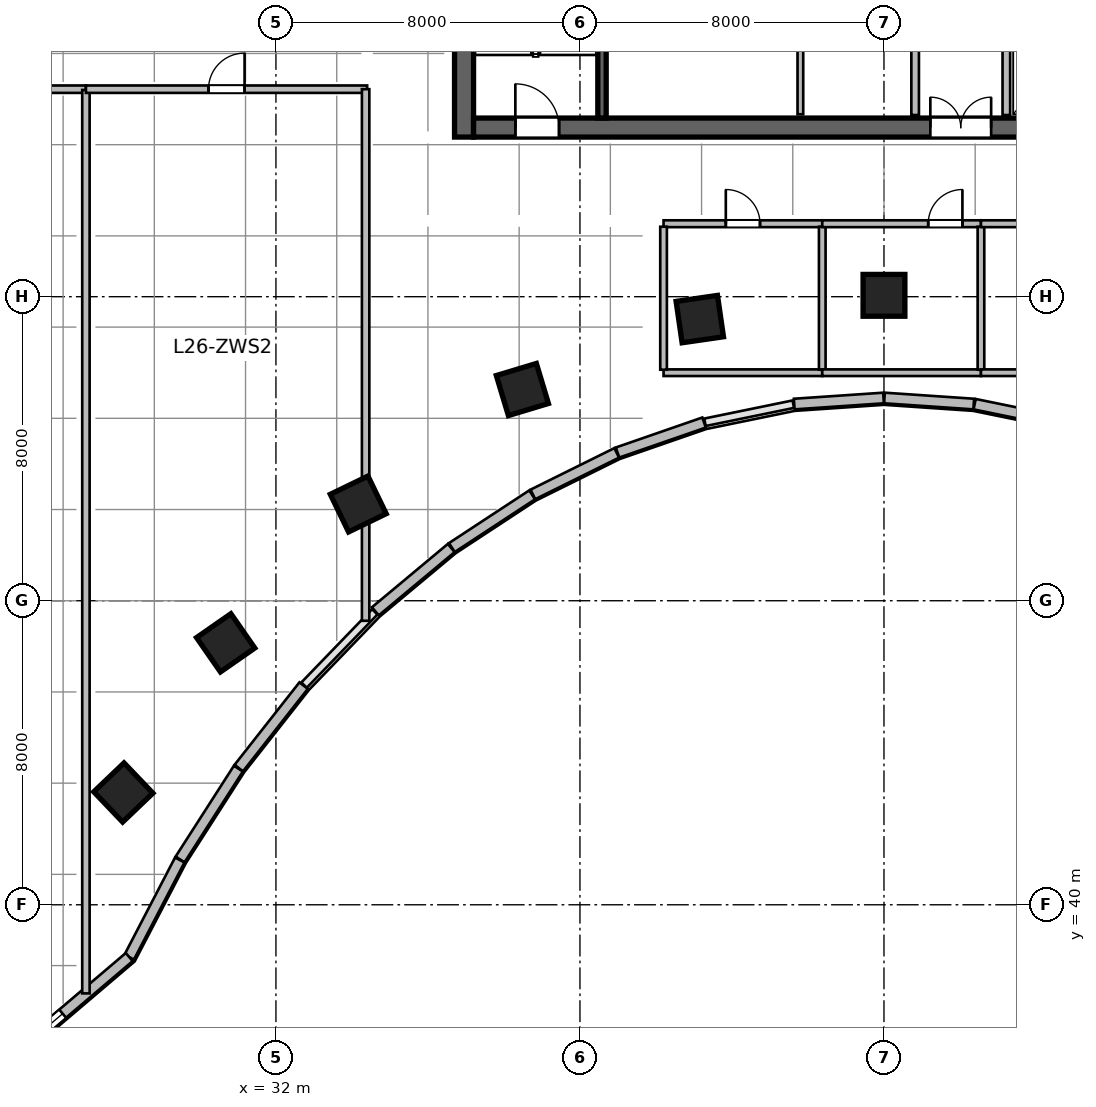
"""IFC4 building model, lengths in metres.
Left out: names, types, materials, properties, quantities, classifications, styles, units other than length and angle.
Written with IfcOpenShell. Run it as: python <this file> out.ifc"""

import sys

from ifc_helpers import new_model, si_unit, direction, frame, frame_2d, origin, origin_2d, place, context, subcontext, project, spatial, rectangle, extrude, source, transform, mapped, element, fill, save


model = new_model("IFC4")
c1 = context("Model", 3, precision=1e-05, world=origin(), true_north=direction((0.0, 1.0)))
c2 = subcontext(c1, "Body", "Model", "MODEL_VIEW")
j1 = project(units=[si_unit("LENGTHUNIT", "METRE"), si_unit("PLANEANGLEUNIT", "RADIAN")], contexts=[c1])
p1 = place(None, origin())
s1 = spatial("IfcSite", under=j1, at=p1, CompositionType="ELEMENT")
p2 = place(p1, origin())
s2 = spatial("IfcBuilding", under=s1, at=p2, CompositionType="ELEMENT")
p3 = place(p2, frame((0.0, 0.0, 111.6)))
s3 = spatial("IfcBuildingStorey", under=s2, at=p3, CompositionType="ELEMENT", Elevation=111.6)
m1 = source(origin(), c2, "Body", "SweptSolid", [
    extrude(rectangle(XDim=12.0, YDim=0.5, at=frame_2d((6.0, 0.0))), origin(), (0.0, 0.0, 1.0), 3.9),
])
p4 = place(p3, frame((36.95, 60.2, 0.0), z_axis=(0.0, 0.0, 1.0), x_axis=(0.0, 1.0, 0.0)))
e1 = element("IfcWall", 1, at=p4, inside=s3, PredefinedType="SHEAR", context=c2, shape_type="MappedRepresentation", body=[
    mapped(m1, transform((0.0, 0.0, 0.0), scale=1.0)),
])
m2 = source(origin(), c2, "Body", "SweptSolid", [
    extrude(rectangle(XDim=21.6, YDim=0.5, at=frame_2d((10.8, 0.0))), origin(), (0.0, 0.0, 1.0), 3.9),
])
p5 = place(p3, frame((37.2, 60.45, 0.0), z_axis=(0.0, 0.0, 1.0), x_axis=(1.0, 0.0, 0.0)))
e2 = element("IfcWall", 2, at=p5, inside=s3, PredefinedType="SHEAR", context=c2, shape_type="MappedRepresentation", body=[
    mapped(m2, transform((0.0, 0.0, 0.0), scale=1.0)),
])
p6 = place(p5, frame((1.1, 0.0, 0.0)))
e3 = element("IfcOpeningElement", 3, at=p6, cuts=e2, PredefinedType="OPENING", context=c2, shape_type="SweptSolid", body=[
    extrude(rectangle(XDim=1.15, YDim=2.15, at=frame_2d((0.575, 1.075))), frame((0.0, 0.26, 0.0), z_axis=(0.0, -1.0, 0.0), x_axis=(1.0, 0.0, 0.0)), (0.0, 0.0, 1.0), 0.52),
])
p7 = place(p5, frame((19.5, 0.0, 0.0)))
e4 = element("IfcOpeningElement", 4, at=p7, cuts=e2, PredefinedType="OPENING", context=c2, shape_type="SweptSolid", body=[
    extrude(rectangle(XDim=0.9, YDim=2.1, at=frame_2d((0.45, 1.05))), frame((0.0, 0.26, 0.0), z_axis=(0.0, -1.0, 0.0), x_axis=(1.0, 0.0, 0.0)), (0.0, 0.0, 1.0), 0.52),
])
p8 = place(p5, frame((12.02, 0.0, 0.0)))
e5 = element("IfcOpeningElement", 5, at=p8, cuts=e2, PredefinedType="OPENING", context=c2, shape_type="SweptSolid", body=[
    extrude(rectangle(XDim=1.6, YDim=2.15, at=frame_2d((0.8, 1.075))), frame((0.0, 0.26, 0.0), z_axis=(0.0, -1.0, 0.0), x_axis=(1.0, 0.0, 0.0)), (0.0, 0.0, 1.0), 0.52),
])
m3 = source(origin(), c2, "Body", "SweptSolid", [
    extrude(rectangle(XDim=11.0, YDim=0.22, at=frame_2d((5.5, 0.0))), origin(), (0.0, 0.0, 1.0), 3.9),
])
p9 = place(p3, frame((40.58, 60.7, 0.0), z_axis=(0.0, 0.0, 1.0), x_axis=(0.0, 1.0, 0.0)))
e6 = element("IfcWall", 6, at=p9, inside=s3, PredefinedType="SHEAR", context=c2, shape_type="MappedRepresentation", body=[
    mapped(m3, transform((0.0, 0.0, 0.0), scale=1.0)),
])
m4 = source(origin(), c2, "Body", "SweptSolid", [
    extrude(rectangle(XDim=1.1, YDim=1.1, at=origin_2d()), origin(), (0.0, 0.0, 1.0), 3.9),
])
for number, where, z_axis, x_axis in (
    (7, (27.985, 42.955, 0.0), (0.0, 0.0, 1.0), (-0.691, 0.723, 0.0)),
    (8, (30.677, 46.892, 0.0), (0.0, 0.0, 1.0), (-0.571, 0.821, 0.0)),
    (9, (34.166, 50.545, 0.0), (0.0, 0.0, 1.0), (-0.436, 0.9, 0.0)),
    (10, (38.485, 53.558, 0.0), (0.0, 0.0, 1.0), (-0.289, 0.957, 0.0)),
    (11, (43.154, 55.411, 0.0), (0.0, 0.0, 1.0), (-0.143, 0.99, 0.0)),
    (12, (48.0, 56.036, 0.0), (0.0, 0.0, 1.0), (0.0, 1.0, 0.0)),
):
    element("IfcColumn", number, at=place(p3, frame(where, z_axis=z_axis, x_axis=x_axis)), inside=s3, PredefinedType="COLUMN", context=c2, shape_type="MappedRepresentation", body=[
        mapped(m4, transform((0.0, 0.0, 0.0), scale=1.0)),
    ])
m5 = source(origin(), c2, "Body", "SweptSolid", [
    extrude(rectangle(XDim=2.374, YDim=0.28, at=frame_2d((1.187, 0.0))), origin(), (0.0, 0.0, 1.0), 3.65),
])
p10 = place(p3, frame((52.711, 52.695, 0.0), z_axis=(0.0, 0.0, 1.0), x_axis=(-0.979619827472, 0.200860632341, 0.0)))
e13 = element("IfcWall", 13, at=p10, inside=s3, PredefinedType="SOLIDWALL", context=c2, shape_type="MappedRepresentation", body=[
    mapped(m5, transform((0.0, 0.0, 0.0), scale=1.0)),
])
m6 = source(origin(), c2, "Body", "SweptSolid", [
    extrude(rectangle(XDim=2.355, YDim=0.28, at=frame_2d((1.177, 0.0))), origin(), (0.0, 0.0, 1.0), 3.65),
])
for number, where, z_axis, x_axis in (
    (14, (50.362, 53.175, 0.0), (0.0, 0.0, 1.0), (-0.998, 0.068, 0.0)),
    (15, (47.988, 53.335, 0.0), (0.0, 0.0, 1.0), (-0.998, -0.068, 0.0)),
):
    element("IfcWall", number, at=place(p3, frame(where, z_axis=z_axis, x_axis=x_axis)), inside=s3, PredefinedType="SOLIDWALL", context=c2, shape_type="MappedRepresentation", body=[
        mapped(m6, transform((0.0, 0.0, 0.0), scale=1.0)),
    ])
m7 = source(origin(), c2, "Body", "SweptSolid", [
    extrude(rectangle(XDim=2.411, YDim=0.28, at=frame_2d((1.205, 0.0))), origin(), (0.0, 0.0, 1.0), 3.65),
])
p11 = place(p3, frame((43.266, 52.689, 0.0), z_axis=(0.0, 0.0, 1.0), x_axis=(-0.944880068161, -0.327416640982, 0.0)))
e16 = element("IfcWall", 16, at=p11, inside=s3, PredefinedType="SOLIDWALL", context=c2, shape_type="MappedRepresentation", body=[
    mapped(m7, transform((0.0, 0.0, 0.0), scale=1.0)),
])
m8 = source(origin(), c2, "Body", "SweptSolid", [
    extrude(rectangle(XDim=2.462, YDim=0.28, at=frame_2d((1.231, 0.0))), origin(), (0.0, 0.0, 1.0), 3.65),
])
p12 = place(p3, frame((40.967, 51.891, 0.0), z_axis=(0.0, 0.0, 1.0), x_axis=(-0.8959882207, -0.444077817917, 0.0)))
e17 = element("IfcWall", 17, at=p12, inside=s3, PredefinedType="SOLIDWALL", context=c2, shape_type="MappedRepresentation", body=[
    mapped(m8, transform((0.0, 0.0, 0.0), scale=1.0)),
])
m9 = source(origin(), c2, "Body", "SweptSolid", [
    extrude(rectangle(XDim=2.527, YDim=0.28, at=frame_2d((1.264, 0.0))), origin(), (0.0, 0.0, 1.0), 3.65),
])
p13 = place(p3, frame((38.742, 50.786, 0.0), z_axis=(0.0, 0.0, 1.0), x_axis=(-0.836011905051, -0.548711303523, 0.0)))
e18 = element("IfcWall", 18, at=p13, inside=s3, PredefinedType="SOLIDWALL", context=c2, shape_type="MappedRepresentation", body=[
    mapped(m9, transform((0.0, 0.0, 0.0), scale=1.0)),
])
m10 = source(origin(), c2, "Body", "SweptSolid", [
    extrude(rectangle(XDim=2.601, YDim=0.28, at=frame_2d((1.3, 0.0))), origin(), (0.0, 0.0, 1.0), 3.65),
])
p14 = place(p3, frame((36.613, 49.387, 0.0), z_axis=(0.0, 0.0, 1.0), x_axis=(-0.76796730295, -0.640489048775, 0.0)))
e19 = element("IfcWall", 19, at=p14, inside=s3, PredefinedType="SOLIDWALL", context=c2, shape_type="MappedRepresentation", body=[
    mapped(m10, transform((0.0, 0.0, 0.0), scale=1.0)),
])
m11 = source(origin(), c2, "Body", "SweptSolid", [
    extrude(rectangle(XDim=2.76, YDim=0.28, at=frame_2d((1.38, 0.0))), origin(), (0.0, 0.0, 1.0), 3.65),
])
p15 = place(p3, frame((32.728, 45.766, 0.0), z_axis=(0.0, 0.0, 1.0), x_axis=(-0.618180818641, -0.786035925047, 0.0)))
e20 = element("IfcWall", 20, at=p15, inside=s3, PredefinedType="SOLIDWALL", context=c2, shape_type="MappedRepresentation", body=[
    mapped(m11, transform((0.0, 0.0, 0.0), scale=1.0)),
])
m12 = source(origin(), c2, "Body", "SweptSolid", [
    extrude(rectangle(XDim=2.84, YDim=0.28, at=frame_2d((1.42, 0.0))), origin(), (0.0, 0.0, 1.0), 3.65),
])
p16 = place(p3, frame((31.011, 43.582, 0.0), z_axis=(0.0, 0.0, 1.0), x_axis=(-0.540214368057, -0.841527442538, 0.0)))
e21 = element("IfcWall", 21, at=p16, inside=s3, PredefinedType="SOLIDWALL", context=c2, shape_type="MappedRepresentation", body=[
    mapped(m12, transform((0.0, 0.0, 0.0), scale=1.0)),
])
m13 = source(origin(), c2, "Body", "SweptSolid", [
    extrude(rectangle(XDim=2.88, YDim=0.28, at=frame_2d((1.44, 0.0))), origin(), (0.0, 0.0, 1.0), 3.65),
])
p17 = place(p3, frame((29.469, 41.178, 0.0), z_axis=(0.0, 0.0, 1.0), x_axis=(-0.461769086658, -0.887000175088, 0.0)))
e22 = element("IfcWall", 22, at=p17, inside=s3, PredefinedType="SOLIDWALL", context=c2, shape_type="MappedRepresentation", body=[
    mapped(m13, transform((0.0, 0.0, 0.0), scale=1.0)),
])
m14 = source(origin(), c2, "Body", "SweptSolid", [
    extrude(rectangle(XDim=4.659, YDim=0.28, at=frame_2d((2.33, 0.0))), origin(), (0.0, 0.0, 1.0), 3.65),
])
p18 = place(p3, frame((28.139, 38.624, 0.0), z_axis=(0.0, 0.0, 1.0), x_axis=(-0.761913458795, -0.647678841176, 0.0)))
e23 = element("IfcWall", 23, at=p18, inside=s3, PredefinedType="SOLIDWALL", context=c2, shape_type="MappedRepresentation", body=[
    mapped(m14, transform((0.0, 0.0, 0.0), scale=1.0)),
])
p19 = place(p18, frame((2.299, 0.0, 0.95)))
e24 = element("IfcOpeningElement", 24, at=p19, cuts=e23, PredefinedType="OPENING", context=c2, shape_type="SweptSolid", body=[
    extrude(rectangle(XDim=2.2, YDim=2.1, at=frame_2d((1.1, 1.05))), frame((0.0, 0.15, 0.0), z_axis=(0.0, -1.0, 0.0), x_axis=(1.0, 0.0, 0.0)), (0.0, 0.0, 1.0), 0.3),
])
m15 = source(origin(), c2, "Body", "SweptSolid", [
    extrude(rectangle(XDim=2.24, YDim=0.2, at=frame_2d((1.12, 0.0))), origin(), (0.0, 0.0, 1.0), 3.65),
])
for number, where, z_axis, x_axis in (
    (25, (48.82, 60.78, 0.0), (0.0, 0.0, 1.0), (0.0, 1.0, 0.0)),
    (26, (51.22, 60.78, 0.0), (0.0, 0.0, 1.0), (0.0, 1.0, 0.0)),
):
    element("IfcWall", number, at=place(p3, frame(where, z_axis=z_axis, x_axis=x_axis)), inside=s3, PredefinedType="SOLIDWALL", context=c2, shape_type="MappedRepresentation", body=[
        mapped(m15, transform((0.0, 0.0, 0.0), scale=1.0)),
    ])
m16 = source(origin(), c2, "Body", "SweptSolid", [
    extrude(rectangle(XDim=2.2, YDim=0.15, at=frame_2d((1.1, 0.0))), origin(), (0.0, 0.0, 1.0), 3.65),
])
p20 = place(p3, frame((45.8, 60.8, 0.0), z_axis=(0.0, 0.0, 1.0), x_axis=(0.0, 1.0, 0.0)))
e27 = element("IfcWall", 27, at=p20, inside=s3, PredefinedType="PARTITIONING", context=c2, shape_type="MappedRepresentation", body=[
    mapped(m16, transform((0.0, 0.0, 0.0), scale=1.0)),
])
m17 = source(origin(), c2, "Body", "SweptSolid", [
    extrude(rectangle(XDim=4.176, YDim=0.175, at=frame_2d((2.088, 0.0))), origin(), (0.0, 0.0, 1.0), 3.65),
])
p21 = place(p3, frame((42.2, 54.0, 0.0), z_axis=(0.0, 0.0, 1.0), x_axis=(1.0, 0.0, 0.0)))
e28 = element("IfcWall", 28, at=p21, inside=s3, PredefinedType="PARTITIONING", context=c2, shape_type="MappedRepresentation", body=[
    mapped(m17, transform((0.0, 0.0, 0.0), scale=1.0)),
])
m18 = source(origin(), c2, "Body", "SweptSolid", [
    extrude(rectangle(XDim=4.176, YDim=0.18, at=frame_2d((2.088, 0.0))), origin(), (0.0, 0.0, 1.0), 3.65),
])
p22 = place(p3, frame((42.2, 57.92, 0.0), z_axis=(0.0, 0.0, 1.0), x_axis=(1.0, 0.0, 0.0)))
e29 = element("IfcWall", 29, at=p22, inside=s3, PredefinedType="PLUMBINGWALL", context=c2, shape_type="MappedRepresentation", body=[
    mapped(m18, transform((0.0, 0.0, 0.0), scale=1.0)),
])
p23 = place(p22, frame((1.638, 0.0, 0.0)))
e30 = element("IfcOpeningElement", 30, at=p23, cuts=e29, PredefinedType="OPENING", context=c2, shape_type="SweptSolid", body=[
    extrude(rectangle(XDim=0.9, YDim=2.08, at=frame_2d((0.45, 1.04))), frame((0.0, 0.1, 0.0), z_axis=(0.0, -1.0, 0.0), x_axis=(1.0, 0.0, 0.0)), (0.0, 0.0, 1.0), 0.2),
])
m19 = source(origin(), c2, "Body", "SweptSolid", [
    extrude(rectangle(XDim=3.763, YDim=0.175, at=frame_2d((1.881, 0.0))), origin(), (0.0, 0.0, 1.0), 3.65),
])
for number, where, z_axis, x_axis in (
    (31, (42.2, 54.079, 0.0), (0.0, 0.0, 1.0), (0.0, 1.0, 0.0)),
    (32, (46.376, 54.079, 0.0), (0.0, 0.0, 1.0), (0.0, 1.0, 0.0)),
):
    element("IfcWall", number, at=place(p3, frame(where, z_axis=z_axis, x_axis=x_axis)), inside=s3, PredefinedType="PARTITIONING", context=c2, shape_type="MappedRepresentation", body=[
        mapped(m19, transform((0.0, 0.0, 0.0), scale=1.0)),
    ])
p24 = place(p3, frame((46.376, 54.0, 0.0), z_axis=(0.0, 0.0, 1.0), x_axis=(1.0, 0.0, 0.0)))
e33 = element("IfcWall", 33, at=p24, inside=s3, PredefinedType="PARTITIONING", context=c2, shape_type="MappedRepresentation", body=[
    mapped(m17, transform((0.0, 0.0, 0.0), scale=1.0)),
])
p25 = place(p3, frame((46.376, 57.92, 0.0), z_axis=(0.0, 0.0, 1.0), x_axis=(1.0, 0.0, 0.0)))
e34 = element("IfcWall", 34, at=p25, inside=s3, PredefinedType="PLUMBINGWALL", context=c2, shape_type="MappedRepresentation", body=[
    mapped(m18, transform((0.0, 0.0, 0.0), scale=1.0)),
])
p26 = place(p25, frame((2.788, 0.0, 0.0)))
e35 = element("IfcOpeningElement", 35, at=p26, cuts=e34, PredefinedType="OPENING", context=c2, shape_type="SweptSolid", body=[
    extrude(rectangle(XDim=0.9, YDim=2.08, at=frame_2d((0.45, 1.04))), frame((0.0, 0.1, 0.0), z_axis=(0.0, -1.0, 0.0), x_axis=(1.0, 0.0, 0.0)), (0.0, 0.0, 1.0), 0.2),
])
p27 = place(p3, frame((50.552, 54.079, 0.0), z_axis=(0.0, 0.0, 1.0), x_axis=(0.0, 1.0, 0.0)))
e36 = element("IfcWall", 36, at=p27, inside=s3, PredefinedType="PARTITIONING", context=c2, shape_type="MappedRepresentation", body=[
    mapped(m19, transform((0.0, 0.0, 0.0), scale=1.0)),
])
m20 = source(origin(), c2, "Body", "SweptSolid", [
    extrude(rectangle(XDim=3.248, YDim=0.175, at=frame_2d((1.624, 0.0))), origin(), (0.0, 0.0, 1.0), 3.65),
])
p28 = place(p3, frame((50.552, 54.0, 0.0), z_axis=(0.0, 0.0, 1.0), x_axis=(1.0, 0.0, 0.0)))
e37 = element("IfcWall", 37, at=p28, inside=s3, PredefinedType="PARTITIONING", context=c2, shape_type="MappedRepresentation", body=[
    mapped(m20, transform((0.0, 0.0, 0.0), scale=1.0)),
])
m21 = source(origin(), c2, "Body", "SweptSolid", [
    extrude(rectangle(XDim=3.248, YDim=0.18, at=frame_2d((1.624, 0.0))), origin(), (0.0, 0.0, 1.0), 3.65),
])
p29 = place(p3, frame((50.552, 57.92, 0.0), z_axis=(0.0, 0.0, 1.0), x_axis=(1.0, 0.0, 0.0)))
e38 = element("IfcWall", 38, at=p29, inside=s3, PredefinedType="PLUMBINGWALL", context=c2, shape_type="MappedRepresentation", body=[
    mapped(m21, transform((0.0, 0.0, 0.0), scale=1.0)),
])
p30 = place(p29, frame((1.149, 0.0, 0.0)))
e39 = element("IfcOpeningElement", 39, at=p30, cuts=e38, PredefinedType="OPENING", context=c2, shape_type="SweptSolid", body=[
    extrude(rectangle(XDim=0.95, YDim=2.12, at=frame_2d((0.475, 1.06))), frame((0.0, 0.1, 0.0), z_axis=(0.0, -1.0, 0.0), x_axis=(1.0, 0.0, 0.0)), (0.0, 0.0, 1.0), 0.2),
])
m22 = source(origin(), c2, "Body", "SweptSolid", [
    extrude(rectangle(XDim=3.82, YDim=0.195, at=frame_2d((1.91, 0.0))), origin(), (0.0, 0.0, 1.0), 3.65),
])
p31 = place(p3, frame((23.18, 61.46, 0.0), z_axis=(0.0, 0.0, 1.0), x_axis=(1.0, 0.0, 0.0)))
e40 = element("IfcWall", 40, at=p31, inside=s3, PredefinedType="PARTITIONING", context=c2, shape_type="MappedRepresentation", body=[
    mapped(m22, transform((0.0, 0.0, 0.0), scale=1.0)),
])
p32 = place(p31, frame((1.435, 0.0, 0.0)))
e41 = element("IfcOpeningElement", 41, at=p32, cuts=e40, PredefinedType="OPENING", context=c2, shape_type="SweptSolid", body=[
    extrude(rectangle(XDim=0.95, YDim=2.1, at=frame_2d((0.475, 1.05))), frame((0.0, 0.107, 0.0), z_axis=(0.0, -1.0, 0.0), x_axis=(1.0, 0.0, 0.0)), (0.0, 0.0, 1.0), 0.215),
])
m23 = source(origin(), c2, "Body", "SweptSolid", [
    extrude(rectangle(XDim=23.771, YDim=0.195, at=frame_2d((11.886, 0.0))), origin(), (0.0, 0.0, 1.0), 2.942),
])
p33 = place(p3, frame((27.0, 37.668, 0.0), z_axis=(0.0, 0.0, 1.0), x_axis=(0.0, 1.0, 0.0)))
e42 = element("IfcWall", 42, at=p33, inside=s3, PredefinedType="PARTITIONING", context=c2, shape_type="MappedRepresentation", body=[
    mapped(m23, transform((0.0, 0.0, 0.0), scale=1.0)),
])
m24 = source(origin(), c2, "Body", "SweptSolid", [
    extrude(rectangle(XDim=7.4, YDim=0.195, at=frame_2d((3.7, 0.0))), origin(), (0.0, 0.0, 1.0), 3.65),
])
p34 = place(p3, frame((27.0, 61.46, 0.0), z_axis=(0.0, 0.0, 1.0), x_axis=(1.0, 0.0, 0.0)))
e43 = element("IfcWall", 43, at=p34, inside=s3, PredefinedType="PARTITIONING", context=c2, shape_type="MappedRepresentation", body=[
    mapped(m24, transform((0.0, 0.0, 0.0), scale=1.0)),
])
p35 = place(p34, frame((3.225, 0.0, 0.0)))
e44 = element("IfcOpeningElement", 44, at=p35, cuts=e43, PredefinedType="OPENING", context=c2, shape_type="SweptSolid", body=[
    extrude(rectangle(XDim=0.95, YDim=2.1, at=frame_2d((0.475, 1.05))), frame((0.0, 0.107, 0.0), z_axis=(0.0, -1.0, 0.0), x_axis=(1.0, 0.0, 0.0)), (0.0, 0.0, 1.0), 0.215),
])
m25 = source(origin(), c2, "Body", "SweptSolid", [
    extrude(rectangle(XDim=13.988, YDim=0.195, at=frame_2d((6.994, 0.0))), origin(), (0.0, 0.0, 1.0), 3.65),
])
p36 = place(p3, frame((34.36, 47.472, 0.0), z_axis=(0.0, 0.0, 1.0), x_axis=(0.0, 1.0, 0.0)))
e45 = element("IfcWall", 45, at=p36, inside=s3, PredefinedType="PARTITIONING", context=c2, shape_type="MappedRepresentation", body=[
    mapped(m25, transform((0.0, 0.0, 0.0), scale=1.0)),
])
m26 = source(origin(), c2, "Body", "SweptSolid", [
    extrude(rectangle(XDim=2.2, YDim=2.1, at=frame_2d((1.1, 1.05))), frame((0.0, 0.03, 0.0), z_axis=(0.0, -1.0, 0.0), x_axis=(1.0, 0.0, 0.0)), (0.0, 0.0, 1.0), 0.06),
])
p37 = place(p19, origin())
e46 = element("IfcWindow", 46, at=p37, inside=s3, PartitioningType="TRIPLE_PANEL_VERTICAL", PredefinedType="WINDOW", context=c2, shape_type="MappedRepresentation", body=[
    mapped(m26, transform((0.0, 0.0, 0.0), scale=1.0)),
])
fill(e24, e46)
m27 = source(origin(), c2, "Body", "SweptSolid", [
    extrude(rectangle(XDim=1.15, YDim=2.15, at=frame_2d((0.575, 1.075))), frame((0.0, 0.025, 0.0), z_axis=(0.0, -1.0, 0.0), x_axis=(1.0, 0.0, 0.0)), (0.0, 0.0, 1.0), 0.05),
])
p38 = place(p6, origin())
e47 = element("IfcDoor", 47, at=p38, inside=s3, OperationType="SINGLE_SWING_LEFT", PredefinedType="DOOR", context=c2, shape_type="MappedRepresentation", body=[
    mapped(m27, transform((0.0, 0.0, 0.0), scale=1.0)),
])
fill(e3, e47)
m28 = source(origin(), c2, "Body", "SweptSolid", [
    extrude(rectangle(XDim=1.6, YDim=2.15, at=frame_2d((0.8, 1.075))), frame((0.0, 0.025, 0.0), z_axis=(0.0, -1.0, 0.0), x_axis=(1.0, 0.0, 0.0)), (0.0, 0.0, 1.0), 0.05),
])
p39 = place(p8, origin())
e48 = element("IfcDoor", 48, at=p39, inside=s3, OperationType="DOUBLE_DOOR_SINGLE_SWING", PredefinedType="DOOR", context=c2, shape_type="MappedRepresentation", body=[
    mapped(m28, transform((0.0, 0.0, 0.0), scale=1.0)),
])
fill(e5, e48)
m29 = source(origin(), c2, "Body", "SweptSolid", [
    extrude(rectangle(XDim=0.9, YDim=2.08, at=frame_2d((0.45, 1.04))), frame((0.0, 0.025, 0.0), z_axis=(0.0, -1.0, 0.0), x_axis=(1.0, 0.0, 0.0)), (0.0, 0.0, 1.0), 0.05),
])
p40 = place(p23, origin())
e49 = element("IfcDoor", 49, at=p40, inside=s3, OperationType="SINGLE_SWING_LEFT", PredefinedType="DOOR", context=c2, shape_type="MappedRepresentation", body=[
    mapped(m29, transform((0.0, 0.0, 0.0), scale=1.0)),
])
fill(e30, e49)
p41 = place(p26, origin())
e50 = element("IfcDoor", 50, at=p41, inside=s3, OperationType="SINGLE_SWING_RIGHT", PredefinedType="DOOR", context=c2, shape_type="MappedRepresentation", body=[
    mapped(m29, transform((0.0, 0.0, 0.0), scale=1.0)),
])
fill(e35, e50)
m30 = source(origin(), c2, "Body", "SweptSolid", [
    extrude(rectangle(XDim=0.95, YDim=2.1, at=frame_2d((0.475, 1.05))), frame((0.0, 0.025, 0.0), z_axis=(0.0, -1.0, 0.0), x_axis=(1.0, 0.0, 0.0)), (0.0, 0.0, 1.0), 0.05),
])
p42 = place(p35, origin())
e51 = element("IfcDoor", 51, at=p42, inside=s3, OperationType="SINGLE_SWING_RIGHT", PredefinedType="DOOR", context=c2, shape_type="MappedRepresentation", body=[
    mapped(m30, transform((0.0, 0.0, 0.0), scale=1.0)),
])
fill(e44, e51)
save(model, sys.argv[1])
